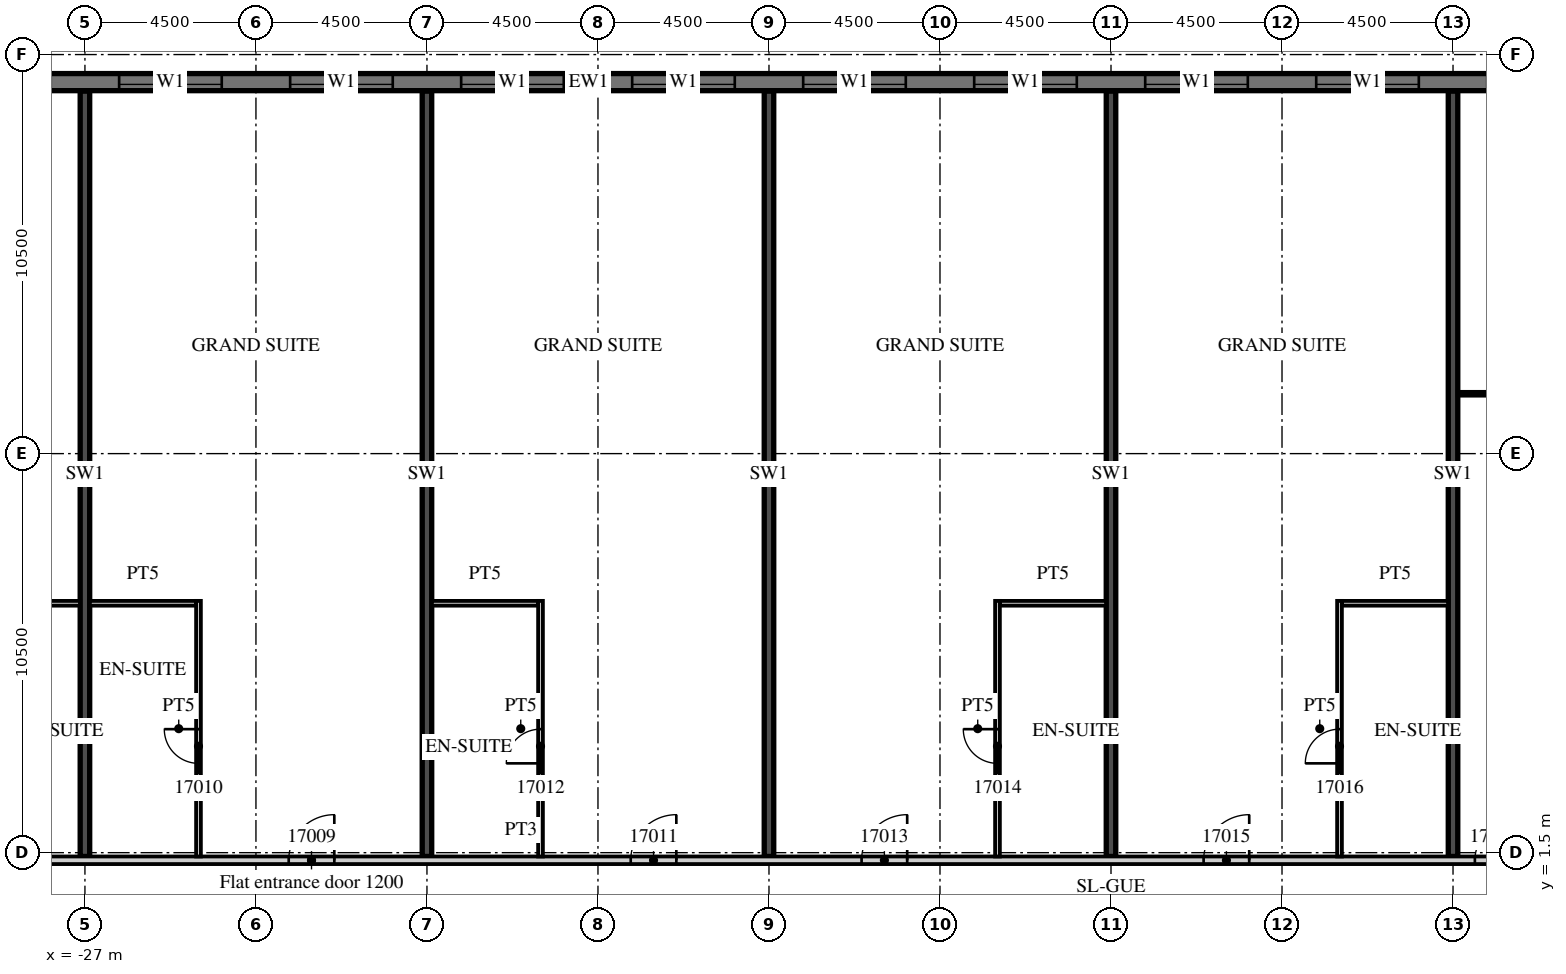
"""IFC4 building model, lengths in metres.
Left out: names, types, materials, properties, quantities, classifications, styles, units other than length and angle.
Written with IfcOpenShell. Run it as: python <this file> out.ifc"""

import sys

from ifc_helpers import new_model, si_unit, direction, frame, frame_2d, origin, place, context, subcontext, project, spatial, rectangle, extrude, element, fill, save


model = new_model("IFC4")
c1 = context("Model", 3, precision=1e-05, world=origin(), true_north=direction((0.0, 1.0)))
c2 = subcontext(c1, "Body", "Model", "MODEL_VIEW")
j1 = project(units=[si_unit("LENGTHUNIT", "METRE"), si_unit("PLANEANGLEUNIT", "RADIAN")], contexts=[c1])
p1 = place(None, origin())
s1 = spatial("IfcSite", under=j1, at=p1, CompositionType="ELEMENT")
p2 = place(p1, origin())
s2 = spatial("IfcBuilding", under=s1, at=p2, CompositionType="ELEMENT")
p3 = place(p2, frame((0.0, 0.0, 86.4)))
s3 = spatial("IfcBuildingStorey", under=s2, at=p3, CompositionType="ELEMENT", Elevation=86.4)
for number, where, z_axis, x_axis in (
    (1, (-27.0, 1.4, 0.0), (0.0, 0.0, 1.0), (0.0, 1.0, 0.0)),
    (2, (-18.0, 1.4, 0.0), (0.0, 0.0, 1.0), (0.0, 1.0, 0.0)),
    (3, (-9.0, 1.4, 0.0), (0.0, 0.0, 1.0), (0.0, 1.0, 0.0)),
    (4, (0.0, 1.4, 0.0), (0.0, 0.0, 1.0), (0.0, 1.0, 0.0)),
    (5, (9.0, 1.4, 0.0), (0.0, 0.0, 1.0), (0.0, 1.0, 0.0)),
):
    element("IfcWall", number, at=place(p3, frame(where, z_axis=z_axis, x_axis=x_axis)), inside=s3, PredefinedType="SHEAR", context=c2, shape_type="SweptSolid", body=[
        extrude(rectangle(XDim=20.14, YDim=0.25, at=frame_2d((10.07, 0.0))), origin(), (0.0, 0.0, 1.0), 3.3),
    ])
p4 = place(p3, frame((13.5, 21.775, 0.0), z_axis=(0.0, 0.0, 1.0), x_axis=(-1.0, 0.0, 0.0)))
e6 = element("IfcWall", 6, at=p4, inside=s3, PredefinedType="SOLIDWALL", context=c2, shape_type="SweptSolid", body=[
    extrude(rectangle(XDim=54.5, YDim=0.45, at=frame_2d((27.25, 0.0))), origin(), (0.0, 0.0, 1.0), 3.02),
])
p5 = place(p4, frame((0.9, 0.0, 0.45)))
e7 = element("IfcOpeningElement", 7, at=p5, cuts=e6, PredefinedType="OPENING", context=c2, shape_type="SweptSolid", body=[
    extrude(rectangle(XDim=2.7, YDim=2.25, at=frame_2d((1.35, 1.125))), frame((0.0, 0.235, 0.0), z_axis=(0.0, -1.0, 0.0), x_axis=(1.0, 0.0, 0.0)), (0.0, 0.0, 1.0), 0.47),
])
p6 = place(p4, frame((5.4, 0.0, 0.45)))
e8 = element("IfcOpeningElement", 8, at=p6, cuts=e6, PredefinedType="OPENING", context=c2, shape_type="SweptSolid", body=[
    extrude(rectangle(XDim=2.7, YDim=2.25, at=frame_2d((1.35, 1.125))), frame((0.0, 0.235, 0.0), z_axis=(0.0, -1.0, 0.0), x_axis=(1.0, 0.0, 0.0)), (0.0, 0.0, 1.0), 0.47),
])
p7 = place(p4, frame((9.9, 0.0, 0.45)))
e9 = element("IfcOpeningElement", 9, at=p7, cuts=e6, PredefinedType="OPENING", context=c2, shape_type="SweptSolid", body=[
    extrude(rectangle(XDim=2.7, YDim=2.25, at=frame_2d((1.35, 1.125))), frame((0.0, 0.235, 0.0), z_axis=(0.0, -1.0, 0.0), x_axis=(1.0, 0.0, 0.0)), (0.0, 0.0, 1.0), 0.47),
])
p8 = place(p4, frame((14.4, 0.0, 0.45)))
e10 = element("IfcOpeningElement", 10, at=p8, cuts=e6, PredefinedType="OPENING", context=c2, shape_type="SweptSolid", body=[
    extrude(rectangle(XDim=2.7, YDim=2.25, at=frame_2d((1.35, 1.125))), frame((0.0, 0.235, 0.0), z_axis=(0.0, -1.0, 0.0), x_axis=(1.0, 0.0, 0.0)), (0.0, 0.0, 1.0), 0.47),
])
p9 = place(p4, frame((18.9, 0.0, 0.45)))
e11 = element("IfcOpeningElement", 11, at=p9, cuts=e6, PredefinedType="OPENING", context=c2, shape_type="SweptSolid", body=[
    extrude(rectangle(XDim=2.7, YDim=2.25, at=frame_2d((1.35, 1.125))), frame((0.0, 0.235, 0.0), z_axis=(0.0, -1.0, 0.0), x_axis=(1.0, 0.0, 0.0)), (0.0, 0.0, 1.0), 0.47),
])
p10 = place(p4, frame((23.4, 0.0, 0.45)))
e12 = element("IfcOpeningElement", 12, at=p10, cuts=e6, PredefinedType="OPENING", context=c2, shape_type="SweptSolid", body=[
    extrude(rectangle(XDim=2.7, YDim=2.25, at=frame_2d((1.35, 1.125))), frame((0.0, 0.235, 0.0), z_axis=(0.0, -1.0, 0.0), x_axis=(1.0, 0.0, 0.0)), (0.0, 0.0, 1.0), 0.47),
])
p11 = place(p4, frame((27.9, 0.0, 0.45)))
e13 = element("IfcOpeningElement", 13, at=p11, cuts=e6, PredefinedType="OPENING", context=c2, shape_type="SweptSolid", body=[
    extrude(rectangle(XDim=2.7, YDim=2.25, at=frame_2d((1.35, 1.125))), frame((0.0, 0.235, 0.0), z_axis=(0.0, -1.0, 0.0), x_axis=(1.0, 0.0, 0.0)), (0.0, 0.0, 1.0), 0.47),
])
p12 = place(p4, frame((32.4, 0.0, 0.45)))
e14 = element("IfcOpeningElement", 14, at=p12, cuts=e6, PredefinedType="OPENING", context=c2, shape_type="SweptSolid", body=[
    extrude(rectangle(XDim=2.7, YDim=2.25, at=frame_2d((1.35, 1.125))), frame((0.0, 0.235, 0.0), z_axis=(0.0, -1.0, 0.0), x_axis=(1.0, 0.0, 0.0)), (0.0, 0.0, 1.0), 0.47),
])
p13 = place(p4, frame((36.9, 0.0, 0.45)))
e15 = element("IfcOpeningElement", 15, at=p13, cuts=e6, PredefinedType="OPENING", context=c2, shape_type="SweptSolid", body=[
    extrude(rectangle(XDim=2.7, YDim=2.25, at=frame_2d((1.35, 1.125))), frame((0.0, 0.235, 0.0), z_axis=(0.0, -1.0, 0.0), x_axis=(1.0, 0.0, 0.0)), (0.0, 0.0, 1.0), 0.47),
])
p14 = place(p4, frame((41.4, 0.0, 0.45)))
e16 = element("IfcOpeningElement", 16, at=p14, cuts=e6, PredefinedType="OPENING", context=c2, shape_type="SweptSolid", body=[
    extrude(rectangle(XDim=2.7, YDim=2.25, at=frame_2d((1.35, 1.125))), frame((0.0, 0.235, 0.0), z_axis=(0.0, -1.0, 0.0), x_axis=(1.0, 0.0, 0.0)), (0.0, 0.0, 1.0), 0.47),
])
p15 = place(p4, frame((45.9, 0.0, 0.45)))
e17 = element("IfcOpeningElement", 17, at=p15, cuts=e6, PredefinedType="OPENING", context=c2, shape_type="SweptSolid", body=[
    extrude(rectangle(XDim=2.7, YDim=2.25, at=frame_2d((1.35, 1.125))), frame((0.0, 0.235, 0.0), z_axis=(0.0, -1.0, 0.0), x_axis=(1.0, 0.0, 0.0)), (0.0, 0.0, 1.0), 0.47),
])
p16 = place(p4, frame((50.4, 0.0, 0.45)))
e18 = element("IfcOpeningElement", 18, at=p16, cuts=e6, PredefinedType="OPENING", context=c2, shape_type="SweptSolid", body=[
    extrude(rectangle(XDim=2.7, YDim=2.25, at=frame_2d((1.35, 1.125))), frame((0.0, 0.235, 0.0), z_axis=(0.0, -1.0, 0.0), x_axis=(1.0, 0.0, 0.0)), (0.0, 0.0, 1.0), 0.47),
])
p17 = place(p3, frame((-44.55, 1.3, 0.0), z_axis=(0.0, 0.0, 1.0), x_axis=(1.0, 0.0, 0.0)))
e19 = element("IfcWall", 19, at=p17, inside=s3, PredefinedType="PARTITIONING", context=c2, shape_type="SweptSolid", body=[
    extrude(rectangle(XDim=58.05, YDim=0.2, at=frame_2d((29.025, 0.0))), origin(), (0.0, 0.0, 1.0), 3.02),
])
p18 = place(p17, frame((0.525, 0.0, 0.0)))
e20 = element("IfcOpeningElement", 20, at=p18, cuts=e19, PredefinedType="OPENING", context=c2, shape_type="SweptSolid", body=[
    extrude(rectangle(XDim=1.0, YDim=2.1, at=frame_2d((0.5, 1.05))), frame((0.0, 0.11, 0.0), z_axis=(0.0, -1.0, 0.0), x_axis=(1.0, 0.0, 0.0)), (0.0, 0.0, 1.0), 0.22),
])
p19 = place(p17, frame((6.975, 0.0, 0.0)))
e21 = element("IfcOpeningElement", 21, at=p19, cuts=e19, PredefinedType="OPENING", context=c2, shape_type="SweptSolid", body=[
    extrude(rectangle(XDim=1.0, YDim=2.1, at=frame_2d((0.5, 1.05))), frame((0.0, 0.11, 0.0), z_axis=(0.0, -1.0, 0.0), x_axis=(1.0, 0.0, 0.0)), (0.0, 0.0, 1.0), 0.22),
])
p20 = place(p17, frame((11.5, 0.0, 0.0)))
e22 = element("IfcOpeningElement", 22, at=p20, cuts=e19, PredefinedType="OPENING", context=c2, shape_type="SweptSolid", body=[
    extrude(rectangle(XDim=1.0, YDim=2.1, at=frame_2d((0.5, 1.05))), frame((0.0, 0.11, 0.0), z_axis=(0.0, -1.0, 0.0), x_axis=(1.0, 0.0, 0.0)), (0.0, 0.0, 1.0), 0.22),
])
p21 = place(p17, frame((13.6, 0.0, 0.0)))
e23 = element("IfcOpeningElement", 23, at=p21, cuts=e19, PredefinedType="OPENING", context=c2, shape_type="SweptSolid", body=[
    extrude(rectangle(XDim=1.0, YDim=2.1, at=frame_2d((0.5, 1.05))), frame((0.0, 0.11, 0.0), z_axis=(0.0, -1.0, 0.0), x_axis=(1.0, 0.0, 0.0)), (0.0, 0.0, 1.0), 0.22),
])
p22 = place(p17, frame((22.912, 0.0, 0.0)))
e24 = element("IfcOpeningElement", 24, at=p22, cuts=e19, PredefinedType="OPENING", context=c2, shape_type="SweptSolid", body=[
    extrude(rectangle(XDim=1.2, YDim=2.1, at=frame_2d((0.6, 1.05))), frame((0.0, 0.11, 0.0), z_axis=(0.0, -1.0, 0.0), x_axis=(1.0, 0.0, 0.0)), (0.0, 0.0, 1.0), 0.22),
])
p23 = place(p17, frame((31.912, 0.0, 0.0)))
e25 = element("IfcOpeningElement", 25, at=p23, cuts=e19, PredefinedType="OPENING", context=c2, shape_type="SweptSolid", body=[
    extrude(rectangle(XDim=1.2, YDim=2.1, at=frame_2d((0.6, 1.05))), frame((0.0, 0.11, 0.0), z_axis=(0.0, -1.0, 0.0), x_axis=(1.0, 0.0, 0.0)), (0.0, 0.0, 1.0), 0.22),
])
p24 = place(p17, frame((37.987, 0.0, 0.0)))
e26 = element("IfcOpeningElement", 26, at=p24, cuts=e19, PredefinedType="OPENING", context=c2, shape_type="SweptSolid", body=[
    extrude(rectangle(XDim=1.2, YDim=2.1, at=frame_2d((0.6, 1.05))), frame((0.0, 0.11, 0.0), z_axis=(0.0, -1.0, 0.0), x_axis=(1.0, 0.0, 0.0)), (0.0, 0.0, 1.0), 0.22),
])
p25 = place(p17, frame((46.987, 0.0, 0.0)))
e27 = element("IfcOpeningElement", 27, at=p25, cuts=e19, PredefinedType="OPENING", context=c2, shape_type="SweptSolid", body=[
    extrude(rectangle(XDim=1.2, YDim=2.1, at=frame_2d((0.6, 1.05))), frame((0.0, 0.11, 0.0), z_axis=(0.0, -1.0, 0.0), x_axis=(1.0, 0.0, 0.0)), (0.0, 0.0, 1.0), 0.22),
])
p26 = place(p17, frame((54.125, 0.0, 0.0)))
e28 = element("IfcOpeningElement", 28, at=p26, cuts=e19, PredefinedType="OPENING", context=c2, shape_type="SweptSolid", body=[
    extrude(rectangle(XDim=1.0, YDim=2.1, at=frame_2d((0.5, 1.05))), frame((0.0, 0.11, 0.0), z_axis=(0.0, -1.0, 0.0), x_axis=(1.0, 0.0, 0.0)), (0.0, 0.0, 1.0), 0.22),
])
p27 = place(p3, frame((-29.375, 8.062, 0.0), z_axis=(0.0, 0.0, 1.0), x_axis=(1.0, 0.0, 0.0)))
e29 = element("IfcWall", 29, at=p27, inside=s3, PredefinedType="PARTITIONING", context=c2, shape_type="SweptSolid", body=[
    extrude(rectangle(XDim=2.25, YDim=0.125, at=frame_2d((1.125, 0.0))), origin(), (0.0, 0.0, 1.0), 3.02),
])
p28 = place(p3, frame((-24.012, 1.4, 0.0), z_axis=(0.0, 0.0, 1.0), x_axis=(0.0, 1.0, 0.0)))
e30 = element("IfcWall", 30, at=p28, inside=s3, PredefinedType="PARTITIONING", context=c2, shape_type="SweptSolid", body=[
    extrude(rectangle(XDim=6.725, YDim=0.125, at=frame_2d((3.363, 0.0))), origin(), (0.0, 0.0, 1.0), 3.02),
])
p29 = place(p28, frame((2.45, 0.0, 0.0)))
e31 = element("IfcOpeningElement", 31, at=p29, cuts=e30, PredefinedType="OPENING", context=c2, shape_type="SweptSolid", body=[
    extrude(rectangle(XDim=0.9, YDim=2.1, at=frame_2d((0.45, 1.05))), frame((0.0, 0.073, 0.0), z_axis=(0.0, -1.0, 0.0), x_axis=(1.0, 0.0, 0.0)), (0.0, 0.0, 1.0), 0.145),
])
p30 = place(p3, frame((-26.875, 8.062, 0.0), z_axis=(0.0, 0.0, 1.0), x_axis=(1.0, 0.0, 0.0)))
e32 = element("IfcWall", 32, at=p30, inside=s3, PredefinedType="PARTITIONING", context=c2, shape_type="SweptSolid", body=[
    extrude(rectangle(XDim=2.8, YDim=0.125, at=frame_2d((1.4, 0.0))), origin(), (0.0, 0.0, 1.0), 3.02),
])
p31 = place(p3, frame((-15.012, 1.4, 0.0), z_axis=(0.0, 0.0, 1.0), x_axis=(0.0, 1.0, 0.0)))
e33 = element("IfcWall", 33, at=p31, inside=s3, PredefinedType="PARTITIONING", context=c2, shape_type="SweptSolid", body=[
    extrude(rectangle(XDim=6.725, YDim=0.125, at=frame_2d((3.363, 0.0))), origin(), (0.0, 0.0, 1.0), 3.02),
])
p32 = place(p31, frame((2.45, 0.0, 0.0)))
e34 = element("IfcOpeningElement", 34, at=p32, cuts=e33, PredefinedType="OPENING", context=c2, shape_type="SweptSolid", body=[
    extrude(rectangle(XDim=0.9, YDim=2.1, at=frame_2d((0.45, 1.05))), frame((0.0, 0.073, 0.0), z_axis=(0.0, -1.0, 0.0), x_axis=(1.0, 0.0, 0.0)), (0.0, 0.0, 1.0), 0.145),
])
p33 = place(p3, frame((-17.875, 8.062, 0.0), z_axis=(0.0, 0.0, 1.0), x_axis=(1.0, 0.0, 0.0)))
e35 = element("IfcWall", 35, at=p33, inside=s3, PredefinedType="PARTITIONING", context=c2, shape_type="SweptSolid", body=[
    extrude(rectangle(XDim=2.8, YDim=0.125, at=frame_2d((1.4, 0.0))), origin(), (0.0, 0.0, 1.0), 3.02),
])
p34 = place(p3, frame((-2.987, 1.4, 0.0), z_axis=(0.0, 0.0, 1.0), x_axis=(0.0, 1.0, 0.0)))
e36 = element("IfcWall", 36, at=p34, inside=s3, PredefinedType="PARTITIONING", context=c2, shape_type="SweptSolid", body=[
    extrude(rectangle(XDim=6.725, YDim=0.125, at=frame_2d((3.363, 0.0))), origin(), (0.0, 0.0, 1.0), 3.02),
])
p35 = place(p34, frame((2.45, 0.0, 0.0)))
e37 = element("IfcOpeningElement", 37, at=p35, cuts=e36, PredefinedType="OPENING", context=c2, shape_type="SweptSolid", body=[
    extrude(rectangle(XDim=0.9, YDim=2.1, at=frame_2d((0.45, 1.05))), frame((0.0, 0.073, 0.0), z_axis=(0.0, -1.0, 0.0), x_axis=(1.0, 0.0, 0.0)), (0.0, 0.0, 1.0), 0.145),
])
p36 = place(p3, frame((-2.925, 8.062, 0.0), z_axis=(0.0, 0.0, 1.0), x_axis=(1.0, 0.0, 0.0)))
e38 = element("IfcWall", 38, at=p36, inside=s3, PredefinedType="PARTITIONING", context=c2, shape_type="SweptSolid", body=[
    extrude(rectangle(XDim=2.8, YDim=0.125, at=frame_2d((1.4, 0.0))), origin(), (0.0, 0.0, 1.0), 3.02),
])
p37 = place(p3, frame((6.013, 1.4, 0.0), z_axis=(0.0, 0.0, 1.0), x_axis=(0.0, 1.0, 0.0)))
e39 = element("IfcWall", 39, at=p37, inside=s3, PredefinedType="PARTITIONING", context=c2, shape_type="SweptSolid", body=[
    extrude(rectangle(XDim=6.725, YDim=0.125, at=frame_2d((3.363, 0.0))), origin(), (0.0, 0.0, 1.0), 3.02),
])
p38 = place(p37, frame((2.45, 0.0, 0.0)))
e40 = element("IfcOpeningElement", 40, at=p38, cuts=e39, PredefinedType="OPENING", context=c2, shape_type="SweptSolid", body=[
    extrude(rectangle(XDim=0.9, YDim=2.1, at=frame_2d((0.45, 1.05))), frame((0.0, 0.073, 0.0), z_axis=(0.0, -1.0, 0.0), x_axis=(1.0, 0.0, 0.0)), (0.0, 0.0, 1.0), 0.145),
])
p39 = place(p3, frame((6.075, 8.062, 0.0), z_axis=(0.0, 0.0, 1.0), x_axis=(1.0, 0.0, 0.0)))
e41 = element("IfcWall", 41, at=p39, inside=s3, PredefinedType="PARTITIONING", context=c2, shape_type="SweptSolid", body=[
    extrude(rectangle(XDim=2.8, YDim=0.125, at=frame_2d((1.4, 0.0))), origin(), (0.0, 0.0, 1.0), 3.02),
])
p40 = place(p3, frame((9.125, 13.575, 0.0), z_axis=(0.0, 0.0, 1.0), x_axis=(1.0, 0.0, 0.0)))
e42 = element("IfcWall", 42, at=p40, inside=s3, PredefinedType="PARTITIONING", context=c2, shape_type="SweptSolid", body=[
    extrude(rectangle(XDim=4.275, YDim=0.1, at=frame_2d((2.137, 0.0))), origin(), (0.0, 0.0, 1.0), 3.02),
])
p41 = place(p40, frame((1.987, 0.0, 0.0)))
e43 = element("IfcOpeningElement", 43, at=p41, cuts=e42, PredefinedType="OPENING", context=c2, shape_type="SweptSolid", body=[
    extrude(rectangle(XDim=1.5, YDim=2.1, at=frame_2d((0.75, 1.05))), frame((0.0, 0.06, 0.0), z_axis=(0.0, -1.0, 0.0), x_axis=(1.0, 0.0, 0.0)), (0.0, 0.0, 1.0), 0.12),
])
p42 = place(p6, origin())
e44 = element("IfcWindow", 44, at=p42, inside=s3, PartitioningType="SINGLE_PANEL", PredefinedType="WINDOW", context=c2, shape_type="SweptSolid", body=[
    extrude(rectangle(XDim=2.7, YDim=2.25, at=frame_2d((1.35, 1.125))), frame((0.0, 0.09, 0.0), z_axis=(0.0, -1.0, 0.0), x_axis=(1.0, 0.0, 0.0)), (0.0, 0.0, 1.0), 0.06),
])
fill(e8, e44)
p43 = place(p7, origin())
e45 = element("IfcWindow", 45, at=p43, inside=s3, PartitioningType="SINGLE_PANEL", PredefinedType="WINDOW", context=c2, shape_type="SweptSolid", body=[
    extrude(rectangle(XDim=2.7, YDim=2.25, at=frame_2d((1.35, 1.125))), frame((0.0, 0.09, 0.0), z_axis=(0.0, -1.0, 0.0), x_axis=(1.0, 0.0, 0.0)), (0.0, 0.0, 1.0), 0.06),
])
fill(e9, e45)
p44 = place(p8, origin())
e46 = element("IfcWindow", 46, at=p44, inside=s3, PartitioningType="SINGLE_PANEL", PredefinedType="WINDOW", context=c2, shape_type="SweptSolid", body=[
    extrude(rectangle(XDim=2.7, YDim=2.25, at=frame_2d((1.35, 1.125))), frame((0.0, 0.09, 0.0), z_axis=(0.0, -1.0, 0.0), x_axis=(1.0, 0.0, 0.0)), (0.0, 0.0, 1.0), 0.06),
])
fill(e10, e46)
p45 = place(p9, origin())
e47 = element("IfcWindow", 47, at=p45, inside=s3, PartitioningType="SINGLE_PANEL", PredefinedType="WINDOW", context=c2, shape_type="SweptSolid", body=[
    extrude(rectangle(XDim=2.7, YDim=2.25, at=frame_2d((1.35, 1.125))), frame((0.0, 0.09, 0.0), z_axis=(0.0, -1.0, 0.0), x_axis=(1.0, 0.0, 0.0)), (0.0, 0.0, 1.0), 0.06),
])
fill(e11, e47)
p46 = place(p10, origin())
e48 = element("IfcWindow", 48, at=p46, inside=s3, PartitioningType="SINGLE_PANEL", PredefinedType="WINDOW", context=c2, shape_type="SweptSolid", body=[
    extrude(rectangle(XDim=2.7, YDim=2.25, at=frame_2d((1.35, 1.125))), frame((0.0, 0.09, 0.0), z_axis=(0.0, -1.0, 0.0), x_axis=(1.0, 0.0, 0.0)), (0.0, 0.0, 1.0), 0.06),
])
fill(e12, e48)
p47 = place(p11, origin())
e49 = element("IfcWindow", 49, at=p47, inside=s3, PartitioningType="SINGLE_PANEL", PredefinedType="WINDOW", context=c2, shape_type="SweptSolid", body=[
    extrude(rectangle(XDim=2.7, YDim=2.25, at=frame_2d((1.35, 1.125))), frame((0.0, 0.09, 0.0), z_axis=(0.0, -1.0, 0.0), x_axis=(1.0, 0.0, 0.0)), (0.0, 0.0, 1.0), 0.06),
])
fill(e13, e49)
p48 = place(p12, origin())
e50 = element("IfcWindow", 50, at=p48, inside=s3, PartitioningType="SINGLE_PANEL", PredefinedType="WINDOW", context=c2, shape_type="SweptSolid", body=[
    extrude(rectangle(XDim=2.7, YDim=2.25, at=frame_2d((1.35, 1.125))), frame((0.0, 0.09, 0.0), z_axis=(0.0, -1.0, 0.0), x_axis=(1.0, 0.0, 0.0)), (0.0, 0.0, 1.0), 0.06),
])
fill(e14, e50)
p49 = place(p13, origin())
e51 = element("IfcWindow", 51, at=p49, inside=s3, PartitioningType="SINGLE_PANEL", PredefinedType="WINDOW", context=c2, shape_type="SweptSolid", body=[
    extrude(rectangle(XDim=2.7, YDim=2.25, at=frame_2d((1.35, 1.125))), frame((0.0, 0.09, 0.0), z_axis=(0.0, -1.0, 0.0), x_axis=(1.0, 0.0, 0.0)), (0.0, 0.0, 1.0), 0.06),
])
fill(e15, e51)
p50 = place(p22, origin())
e52 = element("IfcDoor", 52, at=p50, inside=s3, OperationType="SINGLE_SWING_RIGHT", PredefinedType="DOOR", context=c2, shape_type="SweptSolid", body=[
    extrude(rectangle(XDim=1.2, YDim=2.1, at=frame_2d((0.6, 1.05))), frame((0.0, 0.025, 0.0), z_axis=(0.0, -1.0, 0.0), x_axis=(1.0, 0.0, 0.0)), (0.0, 0.0, 1.0), 0.05),
])
fill(e24, e52)
p51 = place(p29, origin())
e53 = element("IfcDoor", 53, at=p51, inside=s3, OperationType="SINGLE_SWING_RIGHT", PredefinedType="DOOR", context=c2, shape_type="SweptSolid", body=[
    extrude(rectangle(XDim=0.9, YDim=2.1, at=frame_2d((0.45, 1.05))), frame((0.0, 0.025, 0.0), z_axis=(0.0, -1.0, 0.0), x_axis=(1.0, 0.0, 0.0)), (0.0, 0.0, 1.0), 0.05),
])
fill(e31, e53)
p52 = place(p23, origin())
e54 = element("IfcDoor", 54, at=p52, inside=s3, OperationType="SINGLE_SWING_RIGHT", PredefinedType="DOOR", context=c2, shape_type="SweptSolid", body=[
    extrude(rectangle(XDim=1.2, YDim=2.1, at=frame_2d((0.6, 1.05))), frame((0.0, 0.025, 0.0), z_axis=(0.0, -1.0, 0.0), x_axis=(1.0, 0.0, 0.0)), (0.0, 0.0, 1.0), 0.05),
])
fill(e25, e54)
p53 = place(p32, origin())
e55 = element("IfcDoor", 55, at=p53, inside=s3, OperationType="SINGLE_SWING_LEFT", PredefinedType="DOOR", context=c2, shape_type="SweptSolid", body=[
    extrude(rectangle(XDim=0.9, YDim=2.1, at=frame_2d((0.45, 1.05))), frame((0.0, 0.025, 0.0), z_axis=(0.0, -1.0, 0.0), x_axis=(1.0, 0.0, 0.0)), (0.0, 0.0, 1.0), 0.05),
])
fill(e34, e55)
p54 = place(p24, origin())
e56 = element("IfcDoor", 56, at=p54, inside=s3, OperationType="SINGLE_SWING_RIGHT", PredefinedType="DOOR", context=c2, shape_type="SweptSolid", body=[
    extrude(rectangle(XDim=1.2, YDim=2.1, at=frame_2d((0.6, 1.05))), frame((0.0, 0.025, 0.0), z_axis=(0.0, -1.0, 0.0), x_axis=(1.0, 0.0, 0.0)), (0.0, 0.0, 1.0), 0.05),
])
fill(e26, e56)
p55 = place(p35, origin())
e57 = element("IfcDoor", 57, at=p55, inside=s3, OperationType="SINGLE_SWING_RIGHT", PredefinedType="DOOR", context=c2, shape_type="SweptSolid", body=[
    extrude(rectangle(XDim=0.9, YDim=2.1, at=frame_2d((0.45, 1.05))), frame((0.0, 0.025, 0.0), z_axis=(0.0, -1.0, 0.0), x_axis=(1.0, 0.0, 0.0)), (0.0, 0.0, 1.0), 0.05),
])
fill(e37, e57)
p56 = place(p25, origin())
e58 = element("IfcDoor", 58, at=p56, inside=s3, OperationType="SINGLE_SWING_RIGHT", PredefinedType="DOOR", context=c2, shape_type="SweptSolid", body=[
    extrude(rectangle(XDim=1.2, YDim=2.1, at=frame_2d((0.6, 1.05))), frame((0.0, 0.025, 0.0), z_axis=(0.0, -1.0, 0.0), x_axis=(1.0, 0.0, 0.0)), (0.0, 0.0, 1.0), 0.05),
])
fill(e27, e58)
p57 = place(p38, origin())
e59 = element("IfcDoor", 59, at=p57, inside=s3, OperationType="SINGLE_SWING_LEFT", PredefinedType="DOOR", context=c2, shape_type="SweptSolid", body=[
    extrude(rectangle(XDim=0.9, YDim=2.1, at=frame_2d((0.45, 1.05))), frame((0.0, 0.025, 0.0), z_axis=(0.0, -1.0, 0.0), x_axis=(1.0, 0.0, 0.0)), (0.0, 0.0, 1.0), 0.05),
])
fill(e40, e59)
p58 = place(p26, origin())
e60 = element("IfcDoor", 60, at=p58, inside=s3, OperationType="SINGLE_SWING_RIGHT", PredefinedType="DOOR", context=c2, shape_type="SweptSolid", body=[
    extrude(rectangle(XDim=1.0, YDim=2.1, at=frame_2d((0.5, 1.05))), frame((0.0, 0.025, 0.0), z_axis=(0.0, -1.0, 0.0), x_axis=(1.0, 0.0, 0.0)), (0.0, 0.0, 1.0), 0.05),
])
fill(e28, e60)
save(model, sys.argv[1])
